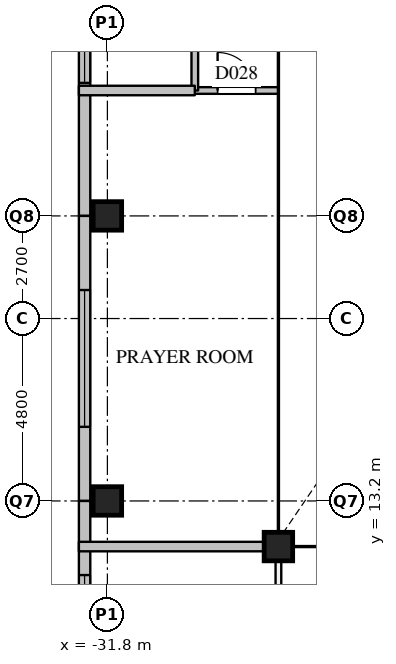
"""IFC4 building model, lengths in metres.
Left out: names, types, materials, properties, quantities, classifications, styles, units other than length and angle.
Written with IfcOpenShell. Run it as: python <this file> out.ifc"""

import sys

from ifc_helpers import new_model, si_unit, direction, frame, frame_2d, origin, origin_2d, place, context, subcontext, project, spatial, rectangle, extrude, element, fill, save


model = new_model("IFC4")
c1 = context("Model", 3, precision=1e-05, world=origin(), true_north=direction((0.0, 1.0)))
c2 = subcontext(c1, "Body", "Model", "MODEL_VIEW")
j1 = project(units=[si_unit("LENGTHUNIT", "METRE"), si_unit("PLANEANGLEUNIT", "RADIAN")], contexts=[c1])
p1 = place(None, origin())
s1 = spatial("IfcSite", under=j1, at=p1, CompositionType="ELEMENT")
p2 = place(p1, origin())
s2 = spatial("IfcBuilding", under=s1, at=p2, CompositionType="ELEMENT")
p3 = place(p2, frame((0.0, 0.0, 21.0)))
s3 = spatial("IfcBuildingStorey", under=s2, at=p3, CompositionType="ELEMENT", Elevation=21.0)
for number, where, z_axis, x_axis in (
    (1, (-31.8, 13.2, 0.0), (0.0, 0.0, 1.0), (1.0, 0.0, 0.0)),
    (2, (-31.8, 20.7, 0.0), (0.0, 0.0, 1.0), (1.0, 0.0, 0.0)),
    (3, (-27.3, 12.0, 0.0), (0.0, 0.0, 1.0), (1.0, 0.0, 0.0)),
):
    element("IfcColumn", number, at=place(p3, frame(where, z_axis=z_axis, x_axis=x_axis)), inside=s3, PredefinedType="COLUMN", context=c2, shape_type="SweptSolid", body=[
        extrude(rectangle(XDim=0.75, YDim=0.75, at=origin_2d()), origin(), (0.0, 0.0, 1.0), 5.0),
    ])
p4 = place(p3, frame((-32.4, 28.2, 0.0), z_axis=(0.0, 0.0, 1.0), x_axis=(0.0, -1.0, 0.0)))
e4 = element("IfcWall", 4, at=p4, inside=s3, PredefinedType="SOLIDWALL", context=c2, shape_type="SweptSolid", body=[
    extrude(rectangle(XDim=7.5, YDim=0.3, at=frame_2d((3.75, 0.0))), origin(), (0.0, 0.0, 1.0), 4.59),
])
p5 = place(p4, frame((0.4, 0.0, 2.4)))
e5 = element("IfcOpeningElement", 5, at=p5, cuts=e4, PredefinedType="OPENING", context=c2, shape_type="SweptSolid", body=[
    extrude(rectangle(XDim=3.6, YDim=1.2, at=frame_2d((1.8, 0.6))), frame((0.0, 0.16, 0.0), z_axis=(0.0, -1.0, 0.0), x_axis=(1.0, 0.0, 0.0)), (0.0, 0.0, 1.0), 0.32),
])
p6 = place(p3, frame((-32.4, 20.7, 0.0), z_axis=(0.0, 0.0, 1.0), x_axis=(0.0, -1.0, 0.0)))
e6 = element("IfcWall", 6, at=p6, inside=s3, PredefinedType="SOLIDWALL", context=c2, shape_type="SweptSolid", body=[
    extrude(rectangle(XDim=7.5, YDim=0.3, at=frame_2d((3.75, 0.0))), origin(), (0.0, 0.0, 1.0), 4.59),
])
p7 = place(p6, frame((1.95, 0.0, 2.4)))
e7 = element("IfcOpeningElement", 7, at=p7, cuts=e6, PredefinedType="OPENING", context=c2, shape_type="SweptSolid", body=[
    extrude(rectangle(XDim=3.6, YDim=1.2, at=frame_2d((1.8, 0.6))), frame((0.0, 0.16, 0.0), z_axis=(0.0, -1.0, 0.0), x_axis=(1.0, 0.0, 0.0)), (0.0, 0.0, 1.0), 0.32),
])
p8 = place(p3, frame((-32.4, 13.2, 0.0), z_axis=(0.0, 0.0, 1.0), x_axis=(0.0, -1.0, 0.0)))
e8 = element("IfcWall", 8, at=p8, inside=s3, PredefinedType="SOLIDWALL", context=c2, shape_type="SweptSolid", body=[
    extrude(rectangle(XDim=7.5, YDim=0.3, at=frame_2d((3.75, 0.0))), origin(), (0.0, 0.0, 1.0), 4.59),
])
p9 = place(p8, frame((1.95, 0.0, 2.4)))
e9 = element("IfcOpeningElement", 9, at=p9, cuts=e8, PredefinedType="OPENING", context=c2, shape_type="SweptSolid", body=[
    extrude(rectangle(XDim=3.6, YDim=1.2, at=frame_2d((1.8, 0.6))), frame((0.0, 0.16, 0.0), z_axis=(0.0, -1.0, 0.0), x_axis=(1.0, 0.0, 0.0)), (0.0, 0.0, 1.0), 0.32),
])
p10 = place(p3, frame((-29.5, 24.0, 0.0), z_axis=(0.0, 0.0, 1.0), x_axis=(1.0, 0.0, 0.0)))
e10 = element("IfcWall", 10, at=p10, inside=s3, PredefinedType="PARTITIONING", context=c2, shape_type="SweptSolid", body=[
    extrude(rectangle(XDim=2.2, YDim=0.175, at=frame_2d((1.1, 0.0))), origin(), (0.0, 0.0, 1.0), 4.55),
])
p11 = place(p10, frame((0.6, 0.0, 0.0)))
e11 = element("IfcOpeningElement", 11, at=p11, cuts=e10, PredefinedType="OPENING", context=c2, shape_type="SweptSolid", body=[
    extrude(rectangle(XDim=1.0, YDim=2.1, at=frame_2d((0.5, 1.05))), frame((0.0, 0.097, 0.0), z_axis=(0.0, -1.0, 0.0), x_axis=(1.0, 0.0, 0.0)), (0.0, 0.0, 1.0), 0.195),
])
p12 = place(p3, frame((-29.5, 24.0, 0.0), z_axis=(0.0, 0.0, 1.0), x_axis=(0.0, 1.0, 0.0)))
e12 = element("IfcWall", 12, at=p12, inside=s3, PredefinedType="PARTITIONING", context=c2, shape_type="SweptSolid", body=[
    extrude(rectangle(XDim=12.5, YDim=0.175, at=frame_2d((6.25, 0.0))), origin(), (0.0, 0.0, 1.0), 3.79),
])
p13 = place(p12, frame((3.0, 0.0, 0.0)))
e13 = element("IfcOpeningElement", 13, at=p13, cuts=e12, PredefinedType="OPENING", context=c2, shape_type="SweptSolid", body=[
    extrude(rectangle(XDim=1.0, YDim=2.1, at=frame_2d((0.5, 1.05))), frame((0.0, 0.097, 0.0), z_axis=(0.0, -1.0, 0.0), x_axis=(1.0, 0.0, 0.0)), (0.0, 0.0, 1.0), 0.195),
])
p14 = place(p12, frame((9.25, 0.0, 0.0)))
e14 = element("IfcOpeningElement", 14, at=p14, cuts=e12, PredefinedType="OPENING", context=c2, shape_type="SweptSolid", body=[
    extrude(rectangle(XDim=1.0, YDim=2.1, at=frame_2d((0.5, 1.05))), frame((0.0, 0.097, 0.0), z_axis=(0.0, -1.0, 0.0), x_axis=(1.0, 0.0, 0.0)), (0.0, 0.0, 1.0), 0.195),
])
p15 = place(p3, frame((-27.3, 3.0, 0.0), z_axis=(0.0, 0.0, 1.0), x_axis=(0.0, 1.0, 0.0)))
e15 = element("IfcWall", 15, at=p15, inside=s3, PredefinedType="PARTITIONING", context=c2, shape_type="SweptSolid", body=[
    extrude(rectangle(XDim=9.0, YDim=0.15, at=frame_2d((4.5, 0.0))), origin(), (0.0, 0.0, 1.0), 3.79),
])
p16 = place(p3, frame((-32.55, 12.0, 0.0), z_axis=(0.0, 0.0, 1.0), x_axis=(1.0, 0.0, 0.0)))
e16 = element("IfcWall", 16, at=p16, inside=s3, PredefinedType="PARTITIONING", context=c2, shape_type="SweptSolid", body=[
    extrude(rectangle(XDim=5.25, YDim=0.25, at=frame_2d((2.625, 0.0))), origin(), (0.0, 0.0, 1.0), 3.79),
])
p17 = place(p3, frame((-32.55, 24.0, 0.0), z_axis=(0.0, 0.0, 1.0), x_axis=(1.0, 0.0, 0.0)))
e17 = element("IfcWall", 17, at=p17, inside=s3, PredefinedType="PARTITIONING", context=c2, shape_type="SweptSolid", body=[
    extrude(rectangle(XDim=3.05, YDim=0.25, at=frame_2d((1.525, 0.0))), origin(), (0.0, 0.0, 1.0), 3.79),
])
p18 = place(p5, origin())
e18 = element("IfcWindow", 18, at=p18, inside=s3, PartitioningType="SINGLE_PANEL", PredefinedType="WINDOW", context=c2, shape_type="SweptSolid", body=[
    extrude(rectangle(XDim=3.6, YDim=1.2, at=frame_2d((1.8, 0.6))), frame((0.0, 0.03, 0.0), z_axis=(0.0, -1.0, 0.0), x_axis=(1.0, 0.0, 0.0)), (0.0, 0.0, 1.0), 0.06),
])
fill(e5, e18)
p19 = place(p7, origin())
e19 = element("IfcWindow", 19, at=p19, inside=s3, PartitioningType="SINGLE_PANEL", PredefinedType="WINDOW", context=c2, shape_type="SweptSolid", body=[
    extrude(rectangle(XDim=3.6, YDim=1.2, at=frame_2d((1.8, 0.6))), frame((0.0, 0.03, 0.0), z_axis=(0.0, -1.0, 0.0), x_axis=(1.0, 0.0, 0.0)), (0.0, 0.0, 1.0), 0.06),
])
fill(e7, e19)
p20 = place(p9, origin())
e20 = element("IfcWindow", 20, at=p20, inside=s3, PartitioningType="SINGLE_PANEL", PredefinedType="WINDOW", context=c2, shape_type="SweptSolid", body=[
    extrude(rectangle(XDim=3.6, YDim=1.2, at=frame_2d((1.8, 0.6))), frame((0.0, 0.03, 0.0), z_axis=(0.0, -1.0, 0.0), x_axis=(1.0, 0.0, 0.0)), (0.0, 0.0, 1.0), 0.06),
])
fill(e9, e20)
p21 = place(p11, origin())
e21 = element("IfcDoor", 21, at=p21, inside=s3, OperationType="SINGLE_SWING_LEFT", PredefinedType="DOOR", context=c2, shape_type="SweptSolid", body=[
    extrude(rectangle(XDim=1.0, YDim=2.1, at=frame_2d((0.5, 1.05))), frame((0.0, 0.025, 0.0), z_axis=(0.0, -1.0, 0.0), x_axis=(1.0, 0.0, 0.0)), (0.0, 0.0, 1.0), 0.05),
])
fill(e11, e21)
save(model, sys.argv[1])
